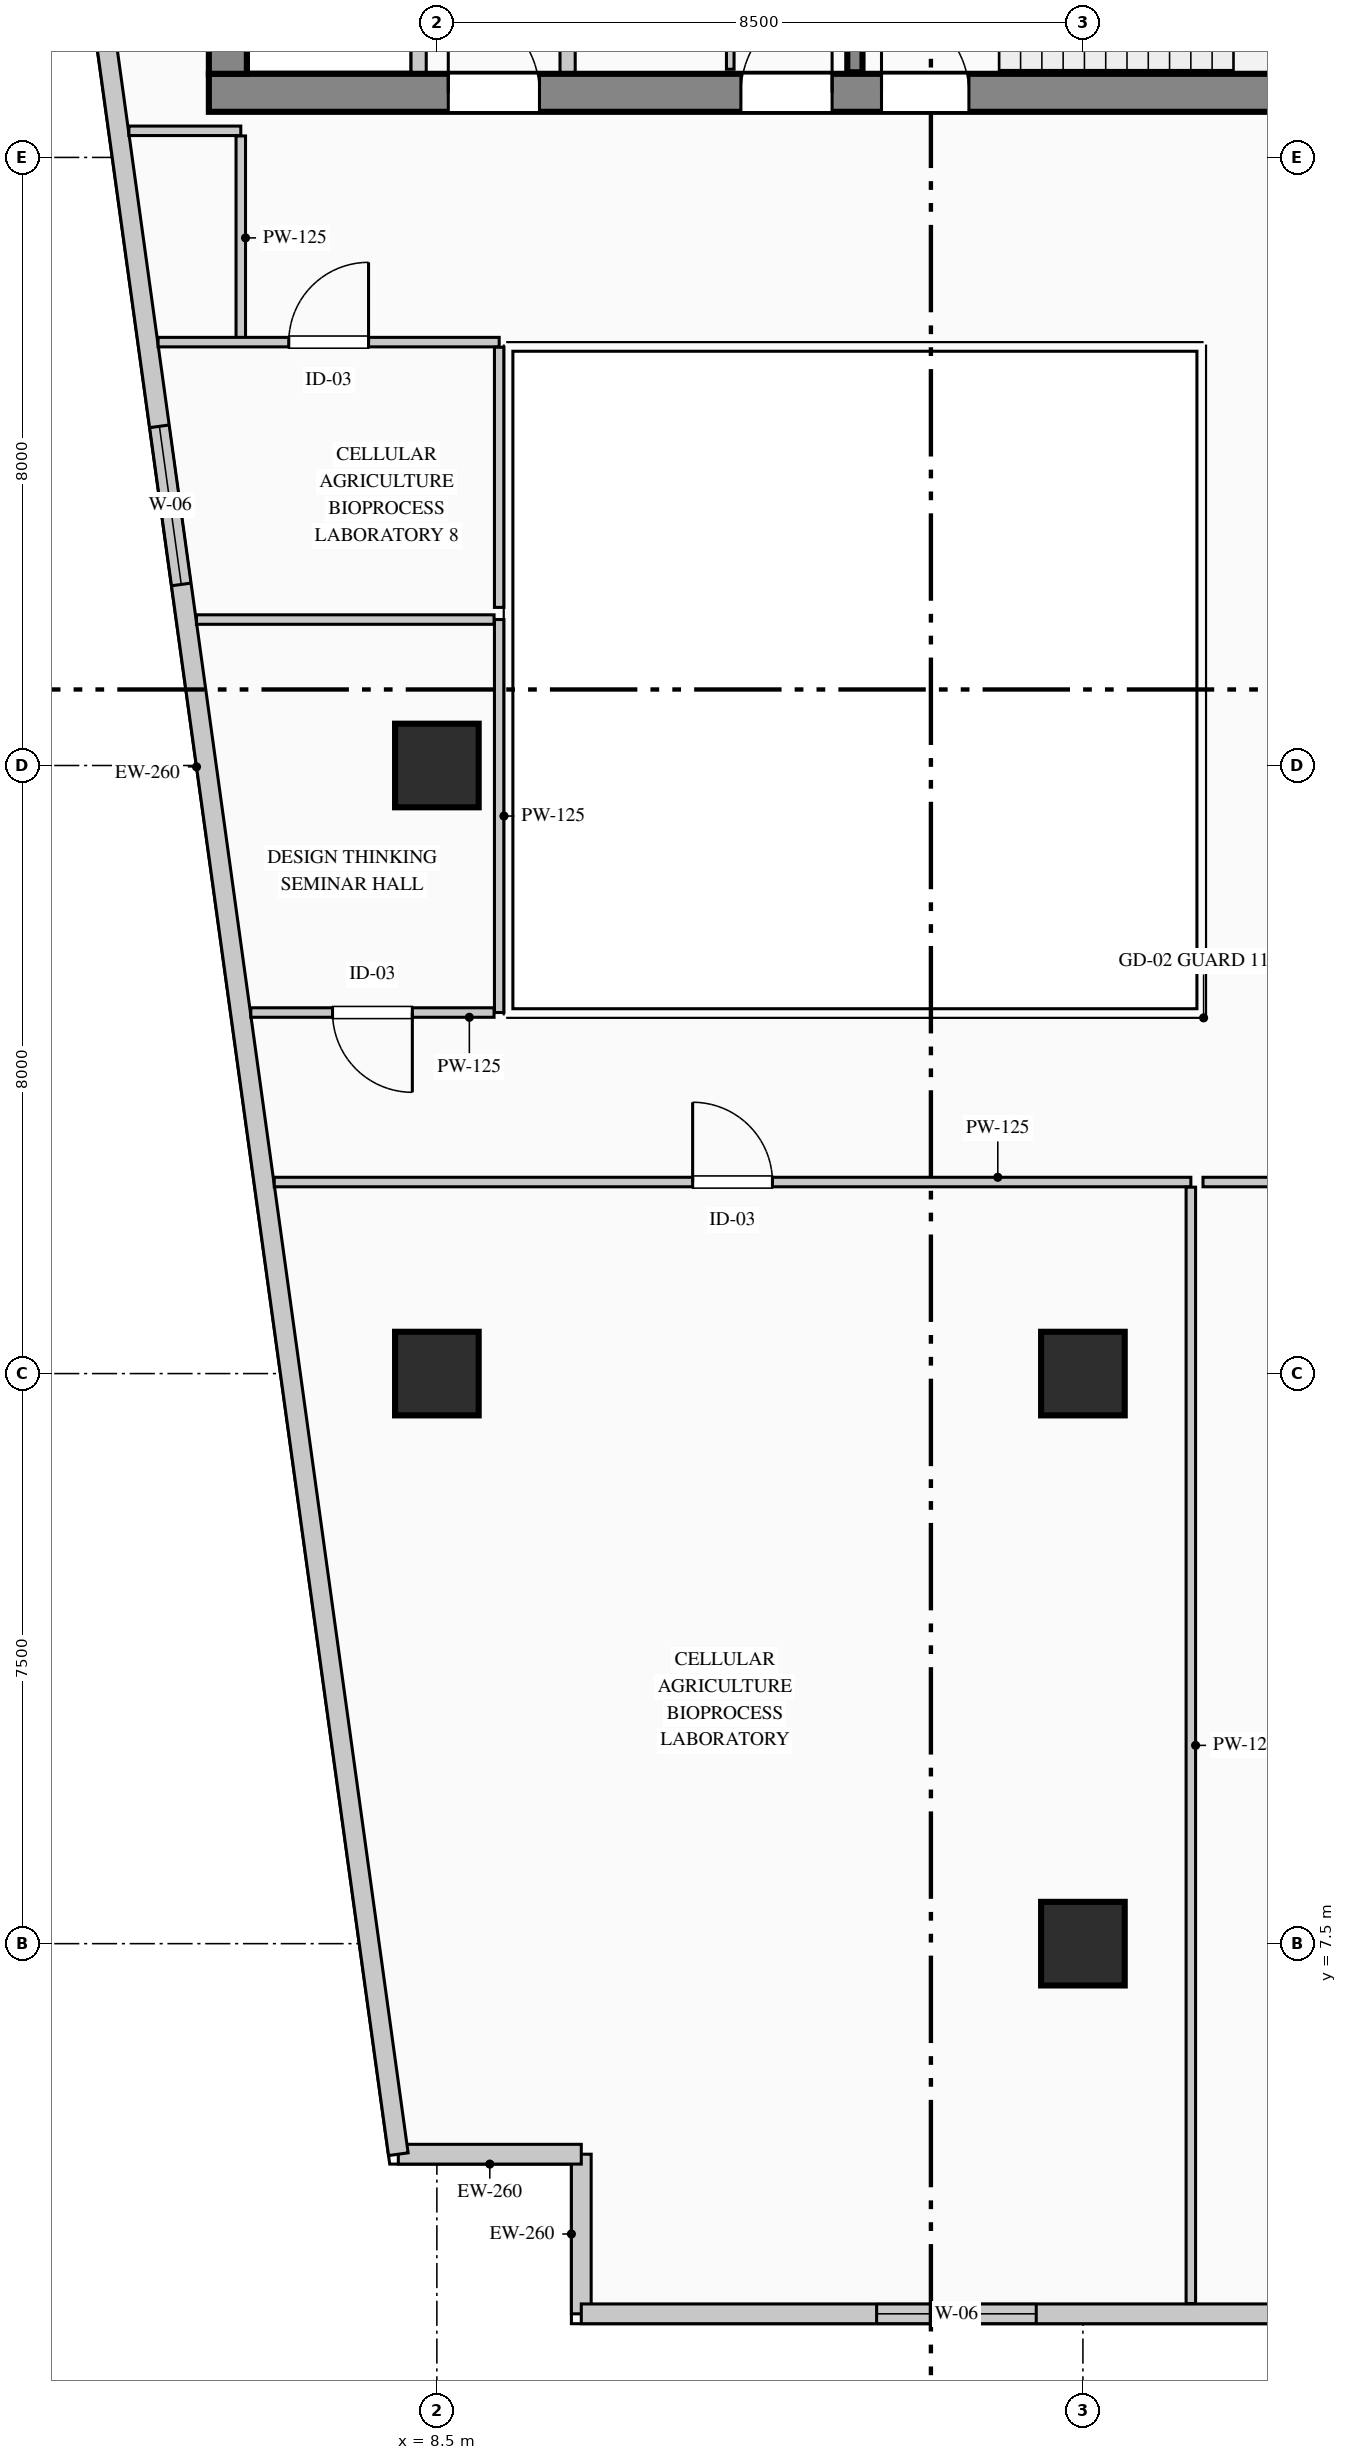
"""IFC4 building model, lengths in metres.
Left out: names, types, materials, properties, quantities, classifications, styles, units other than length and angle.
Written with IfcOpenShell. Run it as: python <this file> out.ifc"""

import sys

from ifc_helpers import new_model, si_unit, direction, frame, frame_2d, origin, origin_2d, place, context, subcontext, project, spatial, rectangle, extrude, element, fill, save


model = new_model("IFC4")
c1 = context("Model", 3, precision=1e-05, world=origin(), true_north=direction((0.0, 1.0)))
c2 = subcontext(c1, "Body", "Model", "MODEL_VIEW")
j1 = project(units=[si_unit("LENGTHUNIT", "METRE"), si_unit("PLANEANGLEUNIT", "RADIAN")], contexts=[c1])
p1 = place(None, origin())
s1 = spatial("IfcSite", under=j1, at=p1, CompositionType="ELEMENT")
p2 = place(p1, origin())
s2 = spatial("IfcBuilding", under=s1, at=p2, CompositionType="ELEMENT")
p3 = place(p2, frame((0.0, 0.0, 143.0)))
s3 = spatial("IfcBuildingStorey", under=s2, at=p3, CompositionType="ELEMENT", Elevation=143.0)
p4 = place(p3, frame((5.5, 31.85, 0.0), z_axis=(0.0, 0.0, 1.0), x_axis=(1.0, 0.0, 0.0)))
e1 = element("IfcWall", 1, at=p4, inside=s3, PredefinedType="SHEAR", context=c2, shape_type="SweptSolid", body=[
    extrude(rectangle(XDim=17.85, YDim=0.5, at=frame_2d((8.925, 0.0))), origin(), (0.0, 0.0, 1.0), 3.95),
])
p5 = place(p4, frame((3.15, 0.0, 0.0)))
e2 = element("IfcOpeningElement", 2, at=p5, cuts=e1, PredefinedType="OPENING", context=c2, shape_type="SweptSolid", body=[
    extrude(rectangle(XDim=1.2, YDim=2.2, at=frame_2d((0.6, 1.1))), frame((0.0, 0.26, 0.0), z_axis=(0.0, -1.0, 0.0), x_axis=(1.0, 0.0, 0.0)), (0.0, 0.0, 1.0), 0.52),
])
p6 = place(p4, frame((7.0, 0.0, 0.0)))
e3 = element("IfcOpeningElement", 3, at=p6, cuts=e1, PredefinedType="OPENING", context=c2, shape_type="SweptSolid", body=[
    extrude(rectangle(XDim=1.2, YDim=2.2, at=frame_2d((0.6, 1.1))), frame((0.0, 0.26, 0.0), z_axis=(0.0, -1.0, 0.0), x_axis=(1.0, 0.0, 0.0)), (0.0, 0.0, 1.0), 0.52),
])
p7 = place(p4, frame((8.85, 0.0, 0.0)))
e4 = element("IfcOpeningElement", 4, at=p7, cuts=e1, PredefinedType="OPENING", context=c2, shape_type="SweptSolid", body=[
    extrude(rectangle(XDim=1.15, YDim=2.2, at=frame_2d((0.575, 1.1))), frame((0.0, 0.26, 0.0), z_axis=(0.0, -1.0, 0.0), x_axis=(1.0, 0.0, 0.0)), (0.0, 0.0, 1.0), 0.52),
])
p8 = place(p4, frame((15.95, 0.0, 0.0)))
e5 = element("IfcOpeningElement", 5, at=p8, cuts=e1, PredefinedType="OPENING", context=c2, shape_type="SweptSolid", body=[
    extrude(rectangle(XDim=1.2, YDim=2.2, at=frame_2d((0.6, 1.1))), frame((0.0, 0.26, 0.0), z_axis=(0.0, -1.0, 0.0), x_axis=(1.0, 0.0, 0.0)), (0.0, 0.0, 1.0), 0.52),
])
p9 = place(p3, frame((5.75, 32.1, 0.0), z_axis=(0.0, 0.0, 1.0), x_axis=(0.0, 1.0, 0.0)))
e6 = element("IfcWall", 6, at=p9, inside=s3, PredefinedType="SHEAR", context=c2, shape_type="SweptSolid", body=[
    extrude(rectangle(XDim=8.3, YDim=0.5, at=frame_2d((4.15, 0.0))), origin(), (0.0, 0.0, 1.0), 3.95),
])
p10 = place(p3, frame((14.0, 32.12, 0.0), z_axis=(0.0, 0.0, 1.0), x_axis=(0.0, 1.0, 0.0)))
e7 = element("IfcWall", 7, at=p10, inside=s3, PredefinedType="SHEAR", context=c2, shape_type="SweptSolid", body=[
    extrude(rectangle(XDim=8.26, YDim=0.2, at=frame_2d((4.13, 0.0))), origin(), (0.0, 0.0, 1.0), 3.95),
])
p11 = place(p10, frame((4.46, 0.0, 0.0)))
e8 = element("IfcOpeningElement", 8, at=p11, cuts=e7, PredefinedType="OPENING", context=c2, shape_type="SweptSolid", body=[
    extrude(rectangle(XDim=1.15, YDim=2.2, at=frame_2d((0.575, 1.1))), frame((0.0, 0.11, 0.0), z_axis=(0.0, -1.0, 0.0), x_axis=(1.0, 0.0, 0.0)), (0.0, 0.0, 1.0), 0.22),
])
for number, where, z_axis, x_axis in (
    (9, (8.5, 15.0, 0.0), (0.0, 0.0, 1.0), (1.0, 0.0, 0.0)),
    (10, (8.5, 23.0, 0.0), (0.0, 0.0, 1.0), (1.0, 0.0, 0.0)),
    (11, (17.0, 7.5, 0.0), (0.0, 0.0, 1.0), (1.0, 0.0, 0.0)),
    (12, (17.0, 15.0, 0.0), (0.0, 0.0, 1.0), (1.0, 0.0, 0.0)),
):
    element("IfcColumn", number, at=place(p3, frame(where, z_axis=z_axis, x_axis=x_axis)), inside=s3, PredefinedType="COLUMN", context=c2, shape_type="SweptSolid", body=[
        extrude(rectangle(XDim=1.1, YDim=1.1, at=origin_2d()), origin(), (0.0, 0.0, 1.0), 3.95),
    ])
p12 = place(p3, frame((10.4, 2.63, 0.0), z_axis=(0.0, 0.0, 1.0), x_axis=(0.0, 1.0, 0.0)))
e13 = element("IfcWall", 13, at=p12, inside=s3, PredefinedType="STANDARD", context=c2, shape_type="SweptSolid", body=[
    extrude(rectangle(XDim=2.1, YDim=0.26, at=frame_2d((1.05, 0.0))), origin(), (0.0, 0.0, 1.0), 3.69),
])
p13 = place(p3, frame((10.4, 4.73, 0.0), z_axis=(0.0, 0.0, 1.0), x_axis=(-1.0, 0.0, 0.0)))
e14 = element("IfcWall", 14, at=p13, inside=s3, PredefinedType="STANDARD", context=c2, shape_type="SweptSolid", body=[
    extrude(rectangle(XDim=2.407, YDim=0.26, at=frame_2d((1.204, 0.0))), origin(), (0.0, 0.0, 1.0), 3.69),
])
p14 = place(p3, frame((7.993, 4.73, 0.0), z_axis=(0.0, 0.0, 1.0), x_axis=(-0.136989009016, 0.990572567462, 0.0)))
e15 = element("IfcWall", 15, at=p14, inside=s3, PredefinedType="STANDARD", context=c2, shape_type="SweptSolid", body=[
    extrude(rectangle(XDim=36.888, YDim=0.26, at=frame_2d((18.444, 0.0))), origin(), (0.0, 0.0, 1.0), 3.69),
])
p15 = place(p14, frame((20.848, 0.0, 0.9)))
e16 = element("IfcOpeningElement", 16, at=p15, cuts=e15, PredefinedType="OPENING", context=c2, shape_type="SweptSolid", body=[
    extrude(rectangle(XDim=2.1, YDim=2.0, at=frame_2d((1.05, 1.0))), frame((0.0, 0.14, 0.0), z_axis=(0.0, -1.0, 0.0), x_axis=(1.0, 0.0, 0.0)), (0.0, 0.0, 1.0), 0.28),
])
p16 = place(p3, frame((24.11, 2.63, 0.0), z_axis=(0.0, 0.0, 1.0), x_axis=(-1.0, 0.0, 0.0)))
e17 = element("IfcWall", 17, at=p16, inside=s3, PredefinedType="STANDARD", context=c2, shape_type="SweptSolid", body=[
    extrude(rectangle(XDim=13.71, YDim=0.26, at=frame_2d((6.855, 0.0))), origin(), (0.0, 0.0, 1.0), 3.69),
])
p17 = place(p16, frame((7.724, 0.0, 0.9)))
e18 = element("IfcOpeningElement", 18, at=p17, cuts=e17, PredefinedType="OPENING", context=c2, shape_type="SweptSolid", body=[
    extrude(rectangle(XDim=2.1, YDim=2.0, at=frame_2d((1.05, 1.0))), frame((0.0, 0.14, 0.0), z_axis=(0.0, -1.0, 0.0), x_axis=(1.0, 0.0, 0.0)), (0.0, 0.0, 1.0), 0.28),
])
p18 = place(p3, frame((8.26, 32.12, 0.0), z_axis=(0.0, 0.0, 1.0), x_axis=(0.0, 1.0, 0.0)))
e19 = element("IfcWall", 19, at=p18, inside=s3, PredefinedType="PARTITIONING", context=c2, shape_type="SweptSolid", body=[
    extrude(rectangle(XDim=7.5, YDim=0.2, at=frame_2d((3.75, 0.0))), origin(), (0.0, 0.0, 1.0), 3.69),
])
p19 = place(p3, frame((10.22, 32.12, 0.0), z_axis=(0.0, 0.0, 1.0), x_axis=(0.0, 1.0, 0.0)))
e20 = element("IfcWall", 20, at=p19, inside=s3, PredefinedType="PARTITIONING", context=c2, shape_type="SweptSolid", body=[
    extrude(rectangle(XDim=8.26, YDim=0.2, at=frame_2d((4.13, 0.0))), origin(), (0.0, 0.0, 1.0), 3.69),
])
p20 = place(p3, frame((12.36, 32.16, 0.0), z_axis=(0.0, 0.0, 1.0), x_axis=(0.0, 1.0, 0.0)))
e21 = element("IfcWall", 21, at=p20, inside=s3, PredefinedType="PARTITIONING", context=c2, shape_type="SweptSolid", body=[
    extrude(rectangle(XDim=1.62, YDim=0.1, at=frame_2d((0.81, 0.0))), origin(), (0.0, 0.0, 1.0), 3.69),
])
p21 = place(p20, frame((0.38, 0.0, 0.0)))
e22 = element("IfcOpeningElement", 22, at=p21, cuts=e21, PredefinedType="OPENING", context=c2, shape_type="SweptSolid", body=[
    extrude(rectangle(XDim=0.85, YDim=2.1, at=frame_2d((0.425, 1.05))), frame((0.0, 0.06, 0.0), z_axis=(0.0, -1.0, 0.0), x_axis=(1.0, 0.0, 0.0)), (0.0, 0.0, 1.0), 0.12),
])
p22 = place(p3, frame((6.36, 17.52, 0.0), z_axis=(0.0, 0.0, 1.0), x_axis=(1.0, 0.0, 0.0)))
e23 = element("IfcWall", 23, at=p22, inside=s3, PredefinedType="PARTITIONING", context=c2, shape_type="SweptSolid", body=[
    extrude(rectangle(XDim=12.06, YDim=0.125, at=frame_2d((6.03, 0.0))), origin(), (0.0, 0.0, 1.0), 3.69),
])
p23 = place(p22, frame((5.505, 0.0, 0.0)))
e24 = element("IfcOpeningElement", 24, at=p23, cuts=e23, PredefinedType="OPENING", context=c2, shape_type="SweptSolid", body=[
    extrude(rectangle(XDim=1.05, YDim=2.15, at=frame_2d((0.525, 1.075))), frame((0.0, 0.073, 0.0), z_axis=(0.0, -1.0, 0.0), x_axis=(1.0, 0.0, 0.0)), (0.0, 0.0, 1.0), 0.145),
])
p24 = place(p3, frame((18.42, 17.452, 0.0), z_axis=(0.0, 0.0, 1.0), x_axis=(0.0, -1.0, 0.0)))
e25 = element("IfcWall", 25, at=p24, inside=s3, PredefinedType="PARTITIONING", context=c2, shape_type="SweptSolid", body=[
    extrude(rectangle(XDim=14.688, YDim=0.125, at=frame_2d((7.344, 0.0))), origin(), (0.0, 0.0, 1.0), 3.69),
])
p25 = place(p3, frame((18.58, 17.52, 0.0), z_axis=(0.0, 0.0, 1.0), x_axis=(1.0, 0.0, 0.0)))
e26 = element("IfcWall", 26, at=p25, inside=s3, PredefinedType="PARTITIONING", context=c2, shape_type="SweptSolid", body=[
    extrude(rectangle(XDim=16.84, YDim=0.125, at=frame_2d((8.42, 0.0))), origin(), (0.0, 0.0, 1.0), 3.275),
])
p26 = place(p25, frame((7.895, 0.0, 0.0)))
e27 = element("IfcOpeningElement", 27, at=p26, cuts=e26, PredefinedType="OPENING", context=c2, shape_type="SweptSolid", body=[
    extrude(rectangle(XDim=1.05, YDim=2.15, at=frame_2d((0.525, 1.075))), frame((0.0, 0.073, 0.0), z_axis=(0.0, -1.0, 0.0), x_axis=(1.0, 0.0, 0.0)), (0.0, 0.0, 1.0), 0.145),
])
p27 = place(p3, frame((9.32, 24.92, 0.0), z_axis=(0.0, 0.0, 1.0), x_axis=(0.0, -1.0, 0.0)))
e28 = element("IfcWall", 28, at=p27, inside=s3, PredefinedType="PARTITIONING", context=c2, shape_type="SweptSolid", body=[
    extrude(rectangle(XDim=5.17, YDim=0.125, at=frame_2d((2.585, 0.0))), origin(), (0.0, 0.0, 1.0), 3.475),
])
p28 = place(p3, frame((9.252, 19.75, 0.0), z_axis=(0.0, 0.0, 1.0), x_axis=(-1.0, 0.0, 0.0)))
e29 = element("IfcWall", 29, at=p28, inside=s3, PredefinedType="PARTITIONING", context=c2, shape_type="SweptSolid", body=[
    extrude(rectangle(XDim=3.2, YDim=0.125, at=frame_2d((1.6, 0.0))), origin(), (0.0, 0.0, 1.0), 3.69),
])
p29 = place(p28, frame((1.075, 0.0, 0.0)))
e30 = element("IfcOpeningElement", 30, at=p29, cuts=e29, PredefinedType="OPENING", context=c2, shape_type="SweptSolid", body=[
    extrude(rectangle(XDim=1.05, YDim=2.15, at=frame_2d((0.525, 1.075))), frame((0.0, 0.073, 0.0), z_axis=(0.0, -1.0, 0.0), x_axis=(1.0, 0.0, 0.0)), (0.0, 0.0, 1.0), 0.145),
])
p30 = place(p3, frame((5.337, 24.92, 0.0), z_axis=(0.0, 0.0, 1.0), x_axis=(1.0, 0.0, 0.0)))
e31 = element("IfcWall", 31, at=p30, inside=s3, PredefinedType="PARTITIONING", context=c2, shape_type="SweptSolid", body=[
    extrude(rectangle(XDim=3.916, YDim=0.125, at=frame_2d((1.958, 0.0))), origin(), (0.0, 0.0, 1.0), 3.69),
])
p31 = place(p3, frame((4.448, 31.35, 0.0), z_axis=(0.0, 0.0, 1.0), x_axis=(1.0, 0.0, 0.0)))
e32 = element("IfcWall", 32, at=p31, inside=s3, PredefinedType="PARTITIONING", context=c2, shape_type="SweptSolid", body=[
    extrude(rectangle(XDim=1.472, YDim=0.125, at=frame_2d((0.736, 0.0))), origin(), (0.0, 0.0, 1.0), 3.69),
])
p32 = place(p3, frame((5.92, 31.282, 0.0), z_axis=(0.0, 0.0, 1.0), x_axis=(0.0, -1.0, 0.0)))
e33 = element("IfcWall", 33, at=p32, inside=s3, PredefinedType="PARTITIONING", context=c2, shape_type="SweptSolid", body=[
    extrude(rectangle(XDim=2.682, YDim=0.125, at=frame_2d((1.341, 0.0))), origin(), (0.0, 0.0, 1.0), 3.69),
])
p33 = place(p3, frame((4.832, 28.57, 0.0), z_axis=(0.0, 0.0, 1.0), x_axis=(1.0, 0.0, 0.0)))
e34 = element("IfcWall", 34, at=p33, inside=s3, PredefinedType="PARTITIONING", context=c2, shape_type="SweptSolid", body=[
    extrude(rectangle(XDim=4.488, YDim=0.125, at=frame_2d((2.244, 0.0))), origin(), (0.0, 0.0, 1.0), 3.69),
])
p34 = place(p33, frame((1.719, 0.0, 0.0)))
e35 = element("IfcOpeningElement", 35, at=p34, cuts=e34, PredefinedType="OPENING", context=c2, shape_type="SweptSolid", body=[
    extrude(rectangle(XDim=1.05, YDim=2.15, at=frame_2d((0.525, 1.075))), frame((0.0, 0.073, 0.0), z_axis=(0.0, -1.0, 0.0), x_axis=(1.0, 0.0, 0.0)), (0.0, 0.0, 1.0), 0.145),
])
p35 = place(p3, frame((9.32, 28.502, 0.0), z_axis=(0.0, 0.0, 1.0), x_axis=(0.0, -1.0, 0.0)))
e36 = element("IfcWall", 36, at=p35, inside=s3, PredefinedType="PARTITIONING", context=c2, shape_type="SweptSolid", body=[
    extrude(rectangle(XDim=3.422, YDim=0.125, at=frame_2d((1.711, 0.0))), origin(), (0.0, 0.0, 1.0), 3.475),
])
p36 = place(p15, origin())
e37 = element("IfcWindow", 37, at=p36, inside=s3, PartitioningType="DOUBLE_PANEL_VERTICAL", PredefinedType="WINDOW", context=c2, shape_type="SweptSolid", body=[
    extrude(rectangle(XDim=2.1, YDim=2.0, at=frame_2d((1.05, 1.0))), frame((0.0, 0.03, 0.0), z_axis=(0.0, -1.0, 0.0), x_axis=(1.0, 0.0, 0.0)), (0.0, 0.0, 1.0), 0.06),
])
fill(e16, e37)
p37 = place(p17, origin())
e38 = element("IfcWindow", 38, at=p37, inside=s3, PartitioningType="DOUBLE_PANEL_VERTICAL", PredefinedType="WINDOW", context=c2, shape_type="SweptSolid", body=[
    extrude(rectangle(XDim=2.1, YDim=2.0, at=frame_2d((1.05, 1.0))), frame((0.0, 0.03, 0.0), z_axis=(0.0, -1.0, 0.0), x_axis=(1.0, 0.0, 0.0)), (0.0, 0.0, 1.0), 0.06),
])
fill(e18, e38)
p38 = place(p5, origin())
e39 = element("IfcDoor", 39, at=p38, inside=s3, OperationType="SINGLE_SWING_LEFT", PredefinedType="DOOR", context=c2, shape_type="SweptSolid", body=[
    extrude(rectangle(XDim=1.2, YDim=2.2, at=frame_2d((0.6, 1.1))), frame((0.0, 0.025, 0.0), z_axis=(0.0, -1.0, 0.0), x_axis=(1.0, 0.0, 0.0)), (0.0, 0.0, 1.0), 0.05),
])
fill(e2, e39)
p39 = place(p6, origin())
e40 = element("IfcDoor", 40, at=p39, inside=s3, OperationType="SINGLE_SWING_RIGHT", PredefinedType="DOOR", context=c2, shape_type="SweptSolid", body=[
    extrude(rectangle(XDim=1.2, YDim=2.2, at=frame_2d((0.6, 1.1))), frame((0.0, 0.025, 0.0), z_axis=(0.0, -1.0, 0.0), x_axis=(1.0, 0.0, 0.0)), (0.0, 0.0, 1.0), 0.05),
])
fill(e3, e40)
p40 = place(p7, origin())
e41 = element("IfcDoor", 41, at=p40, inside=s3, OperationType="SINGLE_SWING_LEFT", PredefinedType="DOOR", context=c2, shape_type="SweptSolid", body=[
    extrude(rectangle(XDim=1.15, YDim=2.2, at=frame_2d((0.575, 1.1))), frame((0.0, 0.025, 0.0), z_axis=(0.0, -1.0, 0.0), x_axis=(1.0, 0.0, 0.0)), (0.0, 0.0, 1.0), 0.05),
])
fill(e4, e41)
p41 = place(p23, origin())
e42 = element("IfcDoor", 42, at=p41, inside=s3, OperationType="SINGLE_SWING_LEFT", PredefinedType="DOOR", context=c2, shape_type="SweptSolid", body=[
    extrude(rectangle(XDim=1.05, YDim=2.15, at=frame_2d((0.525, 1.075))), frame((0.0, 0.025, 0.0), z_axis=(0.0, -1.0, 0.0), x_axis=(1.0, 0.0, 0.0)), (0.0, 0.0, 1.0), 0.05),
])
fill(e24, e42)
p42 = place(p29, origin())
e43 = element("IfcDoor", 43, at=p42, inside=s3, OperationType="SINGLE_SWING_LEFT", PredefinedType="DOOR", context=c2, shape_type="SweptSolid", body=[
    extrude(rectangle(XDim=1.05, YDim=2.15, at=frame_2d((0.525, 1.075))), frame((0.0, 0.025, 0.0), z_axis=(0.0, -1.0, 0.0), x_axis=(1.0, 0.0, 0.0)), (0.0, 0.0, 1.0), 0.05),
])
fill(e30, e43)
p43 = place(p34, origin())
e44 = element("IfcDoor", 44, at=p43, inside=s3, OperationType="SINGLE_SWING_RIGHT", PredefinedType="DOOR", context=c2, shape_type="SweptSolid", body=[
    extrude(rectangle(XDim=1.05, YDim=2.15, at=frame_2d((0.525, 1.075))), frame((0.0, 0.025, 0.0), z_axis=(0.0, -1.0, 0.0), x_axis=(1.0, 0.0, 0.0)), (0.0, 0.0, 1.0), 0.05),
])
fill(e35, e44)
save(model, sys.argv[1])
